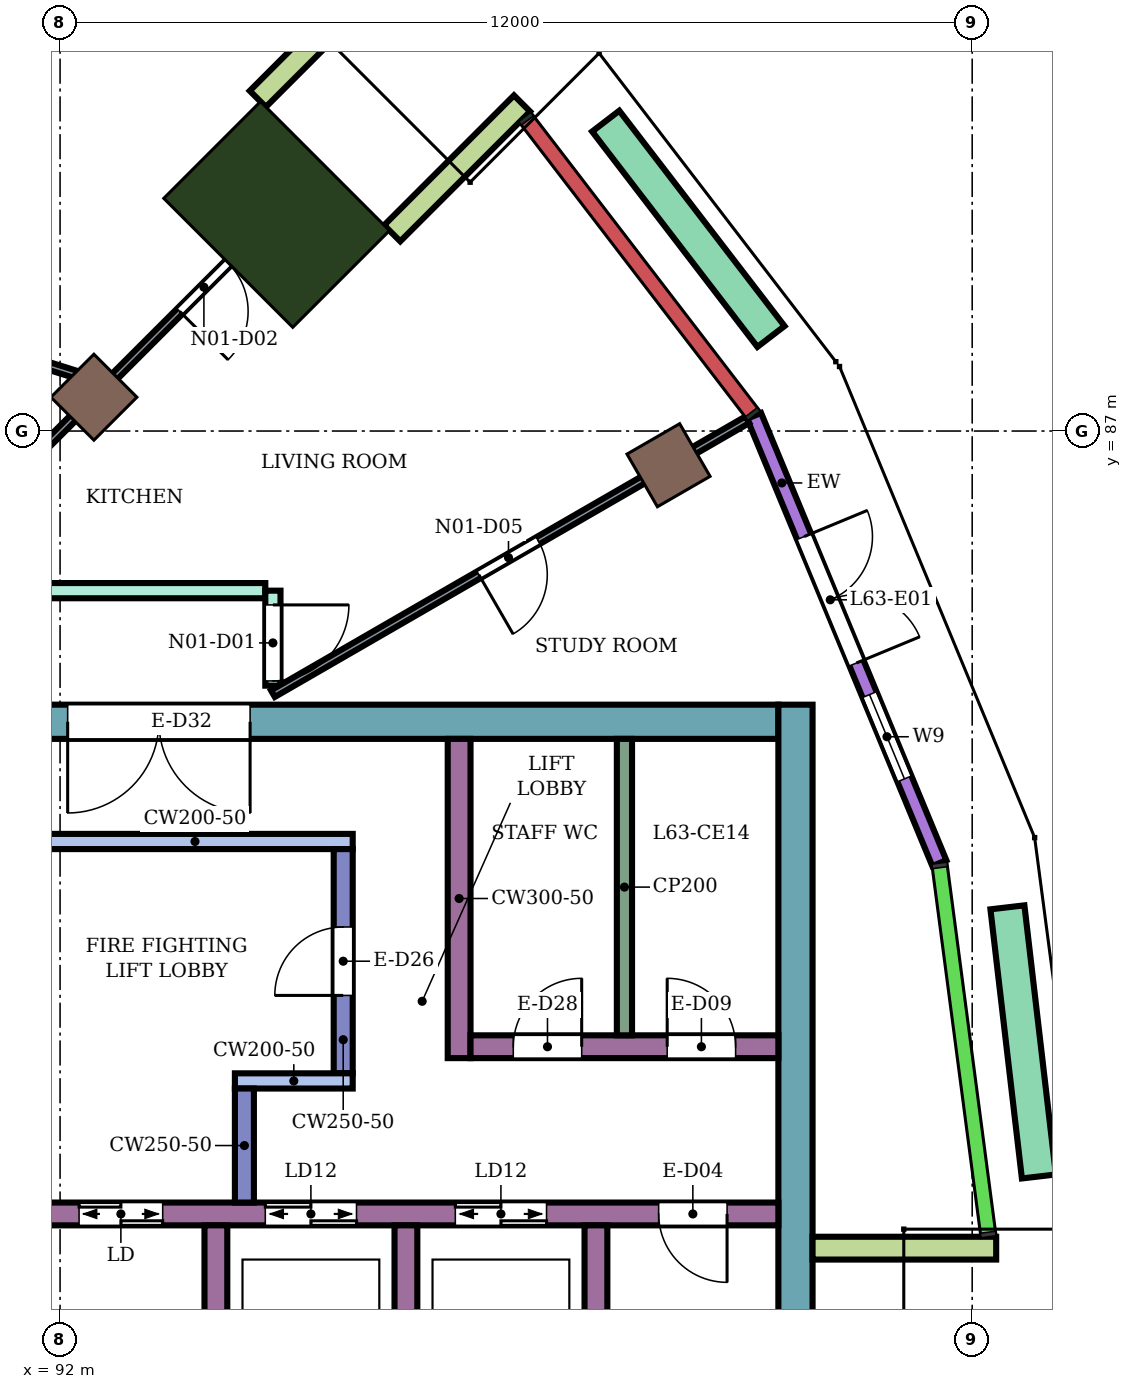
"""IFC4 building model, lengths in metres.
Left out: names, types, materials, properties, quantities, classifications, styles, units other than length and angle.
Written with IfcOpenShell. Run it as: python <this file> out.ifc"""

import sys

from ifc_helpers import new_model, si_unit, direction, frame, frame_2d, origin, origin_2d, place, context, subcontext, project, spatial, rectangle, extrude, element, fill, save


model = new_model("IFC4")
c1 = context("Model", 3, precision=1e-05, world=origin(), true_north=direction((0.0, 1.0)))
c2 = subcontext(c1, "Body", "Model", "MODEL_VIEW")
j1 = project(units=[si_unit("LENGTHUNIT", "METRE"), si_unit("PLANEANGLEUNIT", "RADIAN")], contexts=[c1])
p1 = place(None, origin())
s1 = spatial("IfcSite", under=j1, at=p1, CompositionType="ELEMENT")
p2 = place(p1, origin())
s2 = spatial("IfcBuilding", under=s1, at=p2, CompositionType="ELEMENT")
p3 = place(p2, frame((0.0, 0.0, 275.7)))
s3 = spatial("IfcBuildingStorey", under=s2, at=p3, CompositionType="ELEMENT", Elevation=275.7)
for number, where, z_axis, x_axis in (
    (1, (100.005, 86.55, 0.0), (0.0, 0.0, 1.0), (0.866, 0.5, 0.0)),
    (2, (92.445, 87.445, 0.0), (0.0, 0.0, 1.0), (0.707, 0.707, 0.0)),
):
    element("IfcColumn", number, at=place(p3, frame(where, z_axis=z_axis, x_axis=x_axis)), inside=s3, PredefinedType="COLUMN", context=c2, shape_type="SweptSolid", body=[
        extrude(rectangle(XDim=0.8, YDim=0.8, at=origin_2d()), origin(), (0.0, 0.0, 1.0), 4.2),
    ])
p4 = place(p3, frame((94.849, 89.849, 0.0), z_axis=(0.0, 0.0, 1.0), x_axis=(0.707106781187, 0.707106781187, 0.0)))
e3 = element("IfcColumn", 3, at=p4, inside=s3, PredefinedType="COLUMN", context=c2, shape_type="SweptSolid", body=[
    extrude(rectangle(XDim=1.8, YDim=2.4, at=origin_2d()), origin(), (0.0, 0.0, 1.0), 4.2),
])
p5 = place(p3, frame((87.9, 83.175, 0.0), z_axis=(0.0, 0.0, 1.0), x_axis=(1.0, 0.0, 0.0)))
e4 = element("IfcWall", 4, at=p5, inside=s3, PredefinedType="SHEAR", context=c2, shape_type="SweptSolid", body=[
    extrude(rectangle(XDim=13.55, YDim=0.45, at=frame_2d((6.775, 0.0))), origin(), (0.0, 0.0, 1.0), 3.88),
])
p6 = place(p5, frame((4.2, 0.0, 0.0)))
e5 = element("IfcOpeningElement", 5, at=p6, cuts=e4, PredefinedType="OPENING", context=c2, shape_type="SweptSolid", body=[
    extrude(rectangle(XDim=2.4, YDim=2.4, at=frame_2d((1.2, 1.2))), frame((0.0, 0.235, 0.0), z_axis=(0.0, -1.0, 0.0), x_axis=(1.0, 0.0, 0.0)), (0.0, 0.0, 1.0), 0.47),
])
p7 = place(p3, frame((101.675, 66.6, 0.0), z_axis=(0.0, 0.0, 1.0), x_axis=(0.0, 1.0, 0.0)))
e6 = element("IfcWall", 6, at=p7, inside=s3, PredefinedType="SHEAR", context=c2, shape_type="SweptSolid", body=[
    extrude(rectangle(XDim=16.8, YDim=0.45, at=frame_2d((8.4, 0.0))), origin(), (0.0, 0.0, 1.0), 3.88),
])
p8 = place(p3, frame((91.7, 76.7, 0.0), z_axis=(0.0, 0.0, 1.0), x_axis=(1.0, 0.0, 0.0)))
e7 = element("IfcWall", 7, at=p8, inside=s3, PredefinedType="SHEAR", context=c2, shape_type="SweptSolid", body=[
    extrude(rectangle(XDim=9.75, YDim=0.3, at=frame_2d((4.875, 0.0))), origin(), (0.0, 0.0, 1.0), 3.88),
])
p9 = place(p8, frame((0.55, 0.0, 0.0)))
e8 = element("IfcOpeningElement", 8, at=p9, cuts=e7, PredefinedType="OPENING", context=c2, shape_type="SweptSolid", body=[
    extrude(rectangle(XDim=1.1, YDim=2.1, at=frame_2d((0.55, 1.05))), frame((0.0, 0.16, 0.0), z_axis=(0.0, -1.0, 0.0), x_axis=(1.0, 0.0, 0.0)), (0.0, 0.0, 1.0), 0.32),
])
p10 = place(p8, frame((3.0, 0.0, 0.0)))
e9 = element("IfcOpeningElement", 9, at=p10, cuts=e7, PredefinedType="OPENING", context=c2, shape_type="SweptSolid", body=[
    extrude(rectangle(XDim=1.2, YDim=2.1, at=frame_2d((0.6, 1.05))), frame((0.0, 0.16, 0.0), z_axis=(0.0, -1.0, 0.0), x_axis=(1.0, 0.0, 0.0)), (0.0, 0.0, 1.0), 0.32),
])
p11 = place(p8, frame((5.5, 0.0, 0.0)))
e10 = element("IfcOpeningElement", 10, at=p11, cuts=e7, PredefinedType="OPENING", context=c2, shape_type="SweptSolid", body=[
    extrude(rectangle(XDim=1.2, YDim=2.1, at=frame_2d((0.6, 1.05))), frame((0.0, 0.16, 0.0), z_axis=(0.0, -1.0, 0.0), x_axis=(1.0, 0.0, 0.0)), (0.0, 0.0, 1.0), 0.32),
])
p12 = place(p8, frame((8.175, 0.0, 0.0)))
e11 = element("IfcOpeningElement", 11, at=p12, cuts=e7, PredefinedType="OPENING", context=c2, shape_type="SweptSolid", body=[
    extrude(rectangle(XDim=0.9, YDim=2.1, at=frame_2d((0.45, 1.05))), frame((0.0, 0.16, 0.0), z_axis=(0.0, -1.0, 0.0), x_axis=(1.0, 0.0, 0.0)), (0.0, 0.0, 1.0), 0.32),
])
for number, where, z_axis, x_axis in (
    (12, (94.05, 74.0, 0.0), (0.0, 0.0, 1.0), (0.0, 1.0, 0.0)),
    (13, (96.55, 74.0, 0.0), (0.0, 0.0, 1.0), (0.0, 1.0, 0.0)),
    (14, (99.05, 74.0, 0.0), (0.0, 0.0, 1.0), (0.0, 1.0, 0.0)),
):
    element("IfcWall", number, at=place(p3, frame(where, z_axis=z_axis, x_axis=x_axis)), inside=s3, PredefinedType="SHEAR", context=c2, shape_type="SweptSolid", body=[
        extrude(rectangle(XDim=2.55, YDim=0.3, at=frame_2d((1.275, 0.0))), origin(), (0.0, 0.0, 1.0), 3.88),
    ])
p13 = place(p3, frame((91.7, 81.6, 0.0), z_axis=(0.0, 0.0, 1.0), x_axis=(1.0, 0.0, 0.0)))
e15 = element("IfcWall", 15, at=p13, inside=s3, PredefinedType="SHEAR", context=c2, shape_type="SweptSolid", body=[
    extrude(rectangle(XDim=4.15, YDim=0.2, at=frame_2d((2.075, 0.0))), origin(), (0.0, 0.0, 1.0), 3.88),
])
p14 = place(p3, frame((95.725, 78.55, 0.0), z_axis=(0.0, 0.0, 1.0), x_axis=(0.0, 1.0, 0.0)))
e16 = element("IfcWall", 16, at=p14, inside=s3, PredefinedType="SHEAR", context=c2, shape_type="SweptSolid", body=[
    extrude(rectangle(XDim=2.95, YDim=0.25, at=frame_2d((1.475, 0.0))), origin(), (0.0, 0.0, 1.0), 3.88),
])
p15 = place(p14, frame((1.025, 0.0, 0.0)))
e17 = element("IfcOpeningElement", 17, at=p15, cuts=e16, PredefinedType="OPENING", context=c2, shape_type="SweptSolid", body=[
    extrude(rectangle(XDim=0.9, YDim=2.1, at=frame_2d((0.45, 1.05))), frame((0.0, 0.135, 0.0), z_axis=(0.0, -1.0, 0.0), x_axis=(1.0, 0.0, 0.0)), (0.0, 0.0, 1.0), 0.27),
])
p16 = place(p3, frame((94.3, 78.45, 0.0), z_axis=(0.0, 0.0, 1.0), x_axis=(1.0, 0.0, 0.0)))
e18 = element("IfcWall", 18, at=p16, inside=s3, PredefinedType="SHEAR", context=c2, shape_type="SweptSolid", body=[
    extrude(rectangle(XDim=1.55, YDim=0.2, at=frame_2d((0.775, 0.0))), origin(), (0.0, 0.0, 1.0), 3.88),
])
p17 = place(p3, frame((94.425, 76.85, 0.0), z_axis=(0.0, 0.0, 1.0), x_axis=(0.0, 1.0, 0.0)))
e19 = element("IfcWall", 19, at=p17, inside=s3, PredefinedType="SHEAR", context=c2, shape_type="SweptSolid", body=[
    extrude(rectangle(XDim=1.5, YDim=0.25, at=frame_2d((0.75, 0.0))), origin(), (0.0, 0.0, 1.0), 3.88),
])
p18 = place(p3, frame((97.25, 78.75, 0.0), z_axis=(0.0, 0.0, 1.0), x_axis=(0.0, 1.0, 0.0)))
e20 = element("IfcWall", 20, at=p18, inside=s3, PredefinedType="SHEAR", context=c2, shape_type="SweptSolid", body=[
    extrude(rectangle(XDim=4.2, YDim=0.3, at=frame_2d((2.1, 0.0))), origin(), (0.0, 0.0, 1.0), 3.88),
])
p19 = place(p3, frame((97.4, 78.9, 0.0), z_axis=(0.0, 0.0, 1.0), x_axis=(1.0, 0.0, 0.0)))
e21 = element("IfcWall", 21, at=p19, inside=s3, PredefinedType="SHEAR", context=c2, shape_type="SweptSolid", body=[
    extrude(rectangle(XDim=4.05, YDim=0.3, at=frame_2d((2.025, 0.0))), origin(), (0.0, 0.0, 1.0), 3.88),
])
p20 = place(p19, frame((0.562, 0.0, 0.0)))
e22 = element("IfcOpeningElement", 22, at=p20, cuts=e21, PredefinedType="OPENING", context=c2, shape_type="SweptSolid", body=[
    extrude(rectangle(XDim=0.9, YDim=2.1, at=frame_2d((0.45, 1.05))), frame((0.0, 0.16, 0.0), z_axis=(0.0, -1.0, 0.0), x_axis=(1.0, 0.0, 0.0)), (0.0, 0.0, 1.0), 0.32),
])
p21 = place(p19, frame((2.587, 0.0, 0.0)))
e23 = element("IfcOpeningElement", 23, at=p21, cuts=e21, PredefinedType="OPENING", context=c2, shape_type="SweptSolid", body=[
    extrude(rectangle(XDim=0.9, YDim=2.1, at=frame_2d((0.45, 1.05))), frame((0.0, 0.16, 0.0), z_axis=(0.0, -1.0, 0.0), x_axis=(1.0, 0.0, 0.0)), (0.0, 0.0, 1.0), 0.32),
])
p22 = place(p3, frame((103.568, 81.315, 0.0), z_axis=(0.0, 0.0, 1.0), x_axis=(-0.382690319485, 0.923876679743, 0.0)))
e24 = element("IfcWall", 24, at=p22, inside=s3, PredefinedType="NOTDEFINED", context=c2, shape_type="SweptSolid", body=[
    extrude(rectangle(XDim=6.369, YDim=0.2, at=frame_2d((3.185, 0.0))), origin(), (0.0, 0.0, 1.0), 4.2),
])
p23 = place(p22, frame((1.2, 0.0, 0.9)))
e25 = element("IfcOpeningElement", 25, at=p23, cuts=e24, PredefinedType="OPENING", context=c2, shape_type="SweptSolid", body=[
    extrude(rectangle(XDim=1.2, YDim=2.7, at=frame_2d((0.6, 1.35))), frame((0.0, 0.11, 0.0), z_axis=(0.0, -1.0, 0.0), x_axis=(1.0, 0.0, 0.0)), (0.0, 0.0, 1.0), 0.22),
])
p24 = place(p22, frame((2.85, 0.0, 0.0)))
e26 = element("IfcOpeningElement", 26, at=p24, cuts=e24, PredefinedType="OPENING", context=c2, shape_type="SweptSolid", body=[
    extrude(rectangle(XDim=1.8, YDim=2.7, at=frame_2d((0.9, 1.35))), frame((0.0, 0.11, 0.0), z_axis=(0.0, -1.0, 0.0), x_axis=(1.0, 0.0, 0.0)), (0.0, 0.0, 1.0), 0.22),
])
p25 = place(p3, frame((101.9, 76.25, 0.0), z_axis=(0.0, 0.0, 1.0), x_axis=(1.0, 0.0, 0.0)))
e27 = element("IfcWall", 27, at=p25, inside=s3, PredefinedType="NOTDEFINED", context=c2, shape_type="SweptSolid", body=[
    extrude(rectangle(XDim=2.416, YDim=0.3, at=frame_2d((1.208, 0.0))), origin(), (0.0, 0.0, 1.0), 4.2),
])
for number, where, z_axis, x_axis in (
    (28, (96.37, 89.602, 0.0), (0.0, 0.0, 1.0), (0.707, 0.707, 0.0)),
    (29, (94.602, 91.37, 0.0), (0.0, 0.0, 1.0), (0.707, 0.707, 0.0)),
):
    element("IfcWall", number, at=place(p3, frame(where, z_axis=z_axis, x_axis=x_axis)), inside=s3, PredefinedType="NOTDEFINED", context=c2, shape_type="SweptSolid", body=[
        extrude(rectangle(XDim=2.416, YDim=0.3, at=frame_2d((1.208, 0.0))), origin(), (0.0, 0.0, 1.0), 4.2),
    ])
p26 = place(p3, frame((104.877, 77.193, 0.0), z_axis=(0.0, 0.0, 1.0), x_axis=(-0.116149828965, 0.993231703698, 0.0)))
e30 = element("IfcWall", 30, at=p26, inside=s3, PredefinedType="USERDEFINED", context=c2, shape_type="SweptSolid", body=[
    extrude(rectangle(XDim=3.565, YDim=0.45, at=frame_2d((1.782, 0.0))), origin(), (0.0, 0.0, 1.0), 0.6),
])
p27 = place(p3, frame((101.353, 88.244, 0.0), z_axis=(0.0, 0.0, 1.0), x_axis=(-0.608768756855, 0.793347717383, 0.0)))
e31 = element("IfcWall", 31, at=p27, inside=s3, PredefinedType="USERDEFINED", context=c2, shape_type="SweptSolid", body=[
    extrude(rectangle(XDim=3.571, YDim=0.45, at=frame_2d((1.786, 0.0))), origin(), (0.0, 0.0, 1.0), 0.6),
])
p28 = place(p3, frame((86.678, 86.562, 0.0), z_axis=(0.0, 0.0, 1.0), x_axis=(0.500133037155, 0.865948581122, 0.0)))
e32 = element("IfcWall", 32, at=p28, inside=s3, PredefinedType="PARTITIONING", context=c2, shape_type="SweptSolid", body=[
    extrude(rectangle(XDim=10.946, YDim=0.2, at=frame_2d((5.473, 0.0))), origin(), (0.0, 0.0, 1.0), 3.75),
])
p29 = place(p3, frame((91.8, 84.9, 0.0), z_axis=(0.0, 0.0, 1.0), x_axis=(1.0, 0.0, 0.0)))
e33 = element("IfcWall", 33, at=p29, inside=s3, PredefinedType="PARTITIONING", context=c2, shape_type="SweptSolid", body=[
    extrude(rectangle(XDim=2.9, YDim=0.2, at=frame_2d((1.45, 0.0))), origin(), (0.0, 0.0, 1.0), 3.75),
])
p30 = place(p3, frame((94.8, 83.65, 0.0), z_axis=(0.0, 0.0, 1.0), x_axis=(0.0, 1.0, 0.0)))
e34 = element("IfcWall", 34, at=p30, inside=s3, PredefinedType="PARTITIONING", context=c2, shape_type="SweptSolid", body=[
    extrude(rectangle(XDim=1.25, YDim=0.2, at=frame_2d((0.625, 0.0))), origin(), (0.0, 0.0, 1.0), 3.75),
])
p31 = place(p30, frame((0.062, 0.0, 0.0)))
e35 = element("IfcOpeningElement", 35, at=p31, cuts=e34, PredefinedType="OPENING", context=c2, shape_type="SweptSolid", body=[
    extrude(rectangle(XDim=1.0, YDim=2.1, at=frame_2d((0.5, 1.05))), frame((0.0, 0.11, 0.0), z_axis=(0.0, -1.0, 0.0), x_axis=(1.0, 0.0, 0.0)), (0.0, 0.0, 1.0), 0.22),
])
p32 = place(p3, frame((88.207, 88.999, 0.0), z_axis=(0.0, 0.0, 1.0), x_axis=(0.954166656768, -0.29927577769, 0.0)))
e36 = element("IfcWall", 36, at=p32, inside=s3, PredefinedType="PARTITIONING", context=c2, shape_type="SweptSolid", body=[
    extrude(rectangle(XDim=4.542, YDim=0.1, at=frame_2d((2.271, 0.0))), origin(), (0.0, 0.0, 1.0), 3.75),
])
p33 = place(p32, frame((0.592, 0.0, 0.0)))
e37 = element("IfcOpeningElement", 37, at=p33, cuts=e36, PredefinedType="OPENING", context=c2, shape_type="SweptSolid", body=[
    extrude(rectangle(XDim=0.8, YDim=2.1, at=frame_2d((0.4, 1.05))), frame((0.0, 0.06, 0.0), z_axis=(0.0, -1.0, 0.0), x_axis=(1.0, 0.0, 0.0)), (0.0, 0.0, 1.0), 0.12),
])
p34 = place(p32, frame((2.732, 0.0, 0.0)))
e38 = element("IfcOpeningElement", 38, at=p34, cuts=e36, PredefinedType="OPENING", context=c2, shape_type="SweptSolid", body=[
    extrude(rectangle(XDim=0.8, YDim=2.1, at=frame_2d((0.4, 1.05))), frame((0.0, 0.06, 0.0), z_axis=(0.0, -1.0, 0.0), x_axis=(1.0, 0.0, 0.0)), (0.0, 0.0, 1.0), 0.12),
])
p35 = place(p3, frame((90.395, 85.395, 0.0), z_axis=(0.0, 0.0, 1.0), x_axis=(0.707106781187, 0.707106781187, 0.0)))
e39 = element("IfcWall", 39, at=p35, inside=s3, PredefinedType="PARTITIONING", context=c2, shape_type="SweptSolid", body=[
    extrude(rectangle(XDim=7.0, YDim=0.1, at=frame_2d((3.5, 0.0))), origin(), (0.0, 0.0, 1.0), 3.75),
])
p36 = place(p35, frame((4.496, 0.0, 0.0)))
e40 = element("IfcOpeningElement", 40, at=p36, cuts=e39, PredefinedType="OPENING", context=c2, shape_type="SweptSolid", body=[
    extrude(rectangle(XDim=0.9, YDim=2.1, at=frame_2d((0.45, 1.05))), frame((0.0, 0.06, 0.0), z_axis=(0.0, -1.0, 0.0), x_axis=(1.0, 0.0, 0.0)), (0.0, 0.0, 1.0), 0.12),
])
p37 = place(p3, frame((94.8, 83.545, 0.0), z_axis=(0.0, 0.0, 1.0), x_axis=(0.866044015472, 0.499967762227, 0.0)))
e41 = element("IfcWall", 41, at=p37, inside=s3, PredefinedType="PARTITIONING", context=c2, shape_type="SweptSolid", body=[
    extrude(rectangle(XDim=7.208, YDim=0.1, at=frame_2d((3.604, 0.0))), origin(), (0.0, 0.0, 1.0), 3.75),
])
p38 = place(p37, frame((3.129, 0.0, 0.0)))
e42 = element("IfcOpeningElement", 42, at=p38, cuts=e41, PredefinedType="OPENING", context=c2, shape_type="SweptSolid", body=[
    extrude(rectangle(XDim=0.9, YDim=2.1, at=frame_2d((0.45, 1.05))), frame((0.0, 0.06, 0.0), z_axis=(0.0, -1.0, 0.0), x_axis=(1.0, 0.0, 0.0)), (0.0, 0.0, 1.0), 0.12),
])
p39 = place(p3, frame((99.425, 79.05, 0.0), z_axis=(0.0, 0.0, 1.0), x_axis=(0.0, 1.0, 0.0)))
e43 = element("IfcWall", 43, at=p39, inside=s3, PredefinedType="PARTITIONING", context=c2, shape_type="SweptSolid", body=[
    extrude(rectangle(XDim=3.9, YDim=0.2, at=frame_2d((1.95, 0.0))), origin(), (0.0, 0.0, 1.0), 3.88),
])
p40 = place(p23, origin())
e44 = element("IfcWindow", 44, at=p40, inside=s3, PartitioningType="SINGLE_PANEL", PredefinedType="WINDOW", context=c2, shape_type="SweptSolid", body=[
    extrude(rectangle(XDim=1.2, YDim=2.7, at=frame_2d((0.6, 1.35))), frame((0.0, 0.03, 0.0), z_axis=(0.0, -1.0, 0.0), x_axis=(1.0, 0.0, 0.0)), (0.0, 0.0, 1.0), 0.06),
])
fill(e25, e44)
p41 = place(p24, frame((1.8, 0.0, 0.0), z_axis=(0.0, 0.0, 1.0), x_axis=(-1.0, 0.0, 0.0)))
e45 = element("IfcDoor", 45, at=p41, inside=s3, OperationType="DOUBLE_DOOR_SINGLE_SWING", PredefinedType="DOOR", context=c2, shape_type="SweptSolid", body=[
    extrude(rectangle(XDim=1.8, YDim=2.7, at=frame_2d((0.9, 1.35))), frame((0.0, 0.025, 0.0), z_axis=(0.0, -1.0, 0.0), x_axis=(1.0, 0.0, 0.0)), (0.0, 0.0, 1.0), 0.05),
])
fill(e26, e45)
p42 = place(p31, frame((1.0, 0.0, 0.0), z_axis=(0.0, 0.0, 1.0), x_axis=(-1.0, 0.0, 0.0)))
e46 = element("IfcDoor", 46, at=p42, inside=s3, OperationType="SINGLE_SWING_LEFT", PredefinedType="DOOR", context=c2, shape_type="SweptSolid", body=[
    extrude(rectangle(XDim=1.0, YDim=2.1, at=frame_2d((0.5, 1.05))), frame((0.0, 0.025, 0.0), z_axis=(0.0, -1.0, 0.0), x_axis=(1.0, 0.0, 0.0)), (0.0, 0.0, 1.0), 0.05),
])
fill(e35, e46)
p43 = place(p36, frame((0.9, 0.0, 0.0), z_axis=(0.0, 0.0, 1.0), x_axis=(-1.0, 0.0, 0.0)))
e47 = element("IfcDoor", 47, at=p43, inside=s3, OperationType="SINGLE_SWING_RIGHT", PredefinedType="DOOR", context=c2, shape_type="SweptSolid", body=[
    extrude(rectangle(XDim=0.9, YDim=2.1, at=frame_2d((0.45, 1.05))), frame((0.0, 0.025, 0.0), z_axis=(0.0, -1.0, 0.0), x_axis=(1.0, 0.0, 0.0)), (0.0, 0.0, 1.0), 0.05),
])
fill(e40, e47)
p44 = place(p38, frame((0.9, 0.0, 0.0), z_axis=(0.0, 0.0, 1.0), x_axis=(-1.0, 0.0, 0.0)))
e48 = element("IfcDoor", 48, at=p44, inside=s3, OperationType="SINGLE_SWING_RIGHT", PredefinedType="DOOR", context=c2, shape_type="SweptSolid", body=[
    extrude(rectangle(XDim=0.9, YDim=2.1, at=frame_2d((0.45, 1.05))), frame((0.0, 0.025, 0.0), z_axis=(0.0, -1.0, 0.0), x_axis=(1.0, 0.0, 0.0)), (0.0, 0.0, 1.0), 0.05),
])
fill(e42, e48)
p45 = place(p9, origin())
e49 = element("IfcDoor", 49, at=p45, inside=s3, OperationType="DOUBLE_DOOR_SLIDING", PredefinedType="DOOR", context=c2, shape_type="SweptSolid", body=[
    extrude(rectangle(XDim=1.1, YDim=2.1, at=frame_2d((0.55, 1.05))), frame((0.0, 0.025, 0.0), z_axis=(0.0, -1.0, 0.0), x_axis=(1.0, 0.0, 0.0)), (0.0, 0.0, 1.0), 0.05),
])
fill(e8, e49)
p46 = place(p10, origin())
e50 = element("IfcDoor", 50, at=p46, inside=s3, OperationType="DOUBLE_DOOR_SLIDING", PredefinedType="DOOR", context=c2, shape_type="SweptSolid", body=[
    extrude(rectangle(XDim=1.2, YDim=2.1, at=frame_2d((0.6, 1.05))), frame((0.0, 0.025, 0.0), z_axis=(0.0, -1.0, 0.0), x_axis=(1.0, 0.0, 0.0)), (0.0, 0.0, 1.0), 0.05),
])
fill(e9, e50)
p47 = place(p11, origin())
e51 = element("IfcDoor", 51, at=p47, inside=s3, OperationType="DOUBLE_DOOR_SLIDING", PredefinedType="DOOR", context=c2, shape_type="SweptSolid", body=[
    extrude(rectangle(XDim=1.2, YDim=2.1, at=frame_2d((0.6, 1.05))), frame((0.0, 0.025, 0.0), z_axis=(0.0, -1.0, 0.0), x_axis=(1.0, 0.0, 0.0)), (0.0, 0.0, 1.0), 0.05),
])
fill(e10, e51)
p48 = place(p12, frame((0.9, 0.0, 0.0), z_axis=(0.0, 0.0, 1.0), x_axis=(-1.0, 0.0, 0.0)))
e52 = element("IfcDoor", 52, at=p48, inside=s3, OperationType="SINGLE_SWING_LEFT", PredefinedType="DOOR", context=c2, shape_type="SweptSolid", body=[
    extrude(rectangle(XDim=0.9, YDim=2.1, at=frame_2d((0.45, 1.05))), frame((0.0, 0.025, 0.0), z_axis=(0.0, -1.0, 0.0), x_axis=(1.0, 0.0, 0.0)), (0.0, 0.0, 1.0), 0.05),
])
fill(e11, e52)
p49 = place(p15, origin())
e53 = element("IfcDoor", 53, at=p49, inside=s3, OperationType="SINGLE_SWING_LEFT", PredefinedType="DOOR", context=c2, shape_type="SweptSolid", body=[
    extrude(rectangle(XDim=0.9, YDim=2.1, at=frame_2d((0.45, 1.05))), frame((0.0, 0.025, 0.0), z_axis=(0.0, -1.0, 0.0), x_axis=(1.0, 0.0, 0.0)), (0.0, 0.0, 1.0), 0.05),
])
fill(e17, e53)
p50 = place(p20, origin())
e54 = element("IfcDoor", 54, at=p50, inside=s3, OperationType="SINGLE_SWING_RIGHT", PredefinedType="DOOR", context=c2, shape_type="SweptSolid", body=[
    extrude(rectangle(XDim=0.9, YDim=2.1, at=frame_2d((0.45, 1.05))), frame((0.0, 0.025, 0.0), z_axis=(0.0, -1.0, 0.0), x_axis=(1.0, 0.0, 0.0)), (0.0, 0.0, 1.0), 0.05),
])
fill(e22, e54)
p51 = place(p21, origin())
e55 = element("IfcDoor", 55, at=p51, inside=s3, OperationType="SINGLE_SWING_LEFT", PredefinedType="DOOR", context=c2, shape_type="SweptSolid", body=[
    extrude(rectangle(XDim=0.9, YDim=2.1, at=frame_2d((0.45, 1.05))), frame((0.0, 0.025, 0.0), z_axis=(0.0, -1.0, 0.0), x_axis=(1.0, 0.0, 0.0)), (0.0, 0.0, 1.0), 0.05),
])
fill(e23, e55)
p52 = place(p6, frame((2.4, 0.0, 0.0), z_axis=(0.0, 0.0, 1.0), x_axis=(-1.0, 0.0, 0.0)))
e56 = element("IfcDoor", 56, at=p52, inside=s3, OperationType="DOUBLE_DOOR_SINGLE_SWING", PredefinedType="DOOR", context=c2, shape_type="SweptSolid", body=[
    extrude(rectangle(XDim=2.4, YDim=2.4, at=frame_2d((1.2, 1.2))), frame((0.0, 0.025, 0.0), z_axis=(0.0, -1.0, 0.0), x_axis=(1.0, 0.0, 0.0)), (0.0, 0.0, 1.0), 0.05),
])
fill(e5, e56)
save(model, sys.argv[1])
